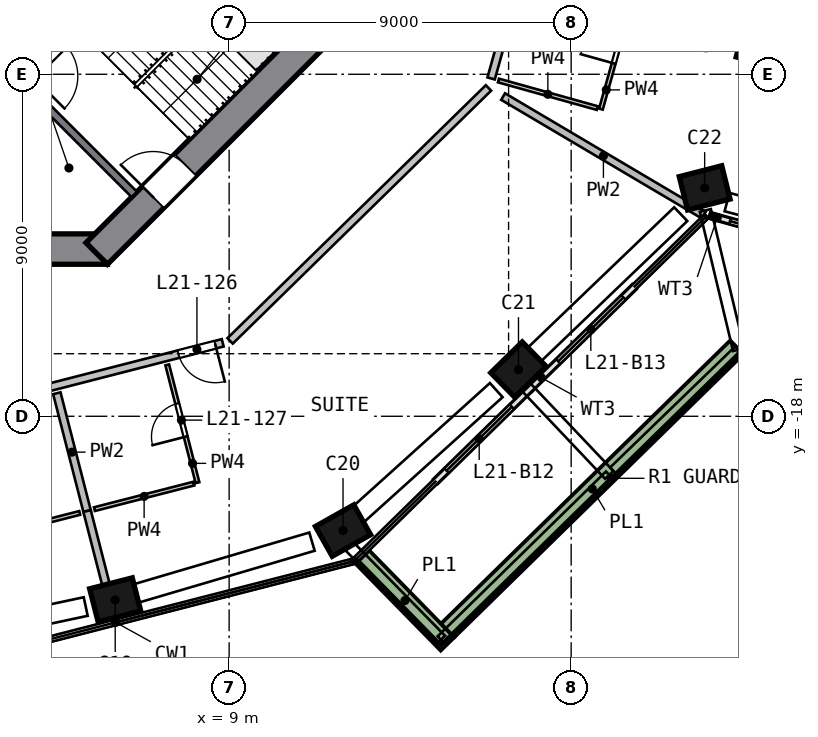
"""IFC4 building model, lengths in metres.
Left out: names, types, materials, properties, quantities, classifications, styles, units other than length and angle.
Written with IfcOpenShell. Run it as: python <this file> out.ifc"""

import sys

from ifc_helpers import new_model, si_unit, direction, frame, frame_2d, origin, origin_2d, place, context, subcontext, project, spatial, rectangle, extrude, element, fill, save


model = new_model("IFC4")
c1 = context("Model", 3, precision=1e-05, world=origin(), true_north=direction((0.0, 1.0)))
c2 = subcontext(c1, "Body", "Model", "MODEL_VIEW")
j1 = project(units=[si_unit("LENGTHUNIT", "METRE"), si_unit("PLANEANGLEUNIT", "RADIAN")], contexts=[c1])
p1 = place(None, origin())
s1 = spatial("IfcSite", under=j1, at=p1, CompositionType="ELEMENT")
p2 = place(p1, origin())
s2 = spatial("IfcBuilding", under=s1, at=p2, CompositionType="ELEMENT")
p3 = place(p2, frame((0.0, 0.0, 93.0)))
s3 = spatial("IfcBuildingStorey", under=s2, at=p3, CompositionType="ELEMENT", Elevation=93.0)
p4 = place(p3, frame((5.871, -22.867, 0.0), z_axis=(0.108524069, 0.028823141, 0.993675879), x_axis=(0.962510976, 0.246911463, -0.112282459)))
e1 = element("IfcColumn", 1, at=p4, inside=s3, PredefinedType="COLUMN", context=c2, shape_type="SweptSolid", body=[
    extrude(rectangle(XDim=1.15, YDim=0.9, at=origin_2d()), origin(), (0.0, 0.0, 1.0), 3.21),
])
p5 = place(p3, frame((11.876, -21.077, 0.0), z_axis=(0.099746568, 0.057323866, 0.993360255), x_axis=(-0.865435181, -0.487634582, 0.115041132)))
e2 = element("IfcColumn", 2, at=p5, inside=s3, PredefinedType="COLUMN", context=c2, shape_type="SweptSolid", body=[
    extrude(rectangle(XDim=1.15, YDim=0.9, at=origin_2d()), origin(), (0.0, 0.0, 1.0), 3.211),
])
p6 = place(p3, frame((16.518, -16.867, 0.0), z_axis=(0.079548847, 0.079244645, 0.993676138), x_axis=(0.709905463, 0.695289434, -0.11228017)))
e3 = element("IfcColumn", 3, at=p6, inside=s3, PredefinedType="COLUMN", context=c2, shape_type="SweptSolid", body=[
    extrude(rectangle(XDim=1.15, YDim=0.9, at=origin_2d()), origin(), (0.0, 0.0, 1.0), 3.21),
])
p7 = place(p3, frame((21.444, -12.113, 0.0), z_axis=(0.056777694, 0.102458276, 0.9931156), x_axis=(-0.96720596, -0.24101204, 0.080161264)))
e4 = element("IfcColumn", 4, at=p7, inside=s3, PredefinedType="COLUMN", context=c2, shape_type="SweptSolid", body=[
    extrude(rectangle(XDim=1.15, YDim=0.9, at=origin_2d()), origin(), (0.0, 0.0, 1.0), 3.212),
])
p8 = place(p3, frame((22.852, -8.36, 0.0), z_axis=(0.038846363, 0.109013082, 0.993280981), x_axis=(0.962880734, -0.269807256, -0.008045955)))
e5 = element("IfcColumn", 5, at=p8, inside=s3, PredefinedType="COLUMN", context=c2, shape_type="SweptSolid", body=[
    extrude(rectangle(XDim=0.9, YDim=0.9, at=origin_2d()), origin(), (0.0, 0.0, 1.0), 3.211),
])
p9 = place(p3, frame((-5.799, -13.6, 0.0), z_axis=(0.0, 0.0, 1.0), x_axis=(1.0, 0.0, 0.0)))
e6 = element("IfcWall", 6, at=p9, inside=s3, PredefinedType="SHEAR", context=c2, shape_type="SweptSolid", body=[
    extrude(rectangle(XDim=11.598, YDim=0.8, at=frame_2d((5.799, 0.0))), origin(), (0.0, 0.0, 1.0), 3.5),
])
p10 = place(p9, frame((4.899, 0.0, 0.0)))
e7 = element("IfcOpeningElement", 7, at=p10, cuts=e6, PredefinedType="OPENING", context=c2, shape_type="SweptSolid", body=[
    extrude(rectangle(XDim=1.8, YDim=2.1, at=frame_2d((0.9, 1.05))), frame((0.0, 0.41, 0.0), z_axis=(0.0, -1.0, 0.0), x_axis=(1.0, 0.0, 0.0)), (0.0, 0.0, 1.0), 0.82),
])
p11 = place(p3, frame((5.516, -13.717, 0.0), z_axis=(0.0, 0.0, 1.0), x_axis=(0.707106781, 0.707106781, 0.0)))
e8 = element("IfcWall", 8, at=p11, inside=s3, PredefinedType="SHEAR", context=c2, shape_type="SweptSolid", body=[
    extrude(rectangle(XDim=11.598, YDim=0.8, at=frame_2d((5.799, 0.0))), origin(), (0.0, 0.0, 1.0), 3.5),
])
p12 = place(p11, frame((2.099, 0.0, 0.0)))
e9 = element("IfcOpeningElement", 9, at=p12, cuts=e8, PredefinedType="OPENING", context=c2, shape_type="SweptSolid", body=[
    extrude(rectangle(XDim=1.2, YDim=2.1, at=frame_2d((0.6, 1.05))), frame((0.0, 0.41, 0.0), z_axis=(0.0, -1.0, 0.0), x_axis=(1.0, 0.0, 0.0)), (0.0, 0.0, 1.0), 0.82),
])
p13 = place(p3, frame((14.438, -19.71, 0.0), z_axis=(0.0, 0.0, 1.0), x_axis=(0.714445304, 0.699691295, 0.0)))
e10 = element("IfcWall", 10, at=p13, inside=s3, PredefinedType="SOLIDWALL", context=c2, shape_type="SweptSolid", body=[
    extrude(rectangle(XDim=3.475, YDim=0.15, at=frame_2d((1.737, 0.0))), origin(), (0.0, 0.0, 1.0), 2.425),
])
p14 = place(p13, frame((0.4, 0.0, 0.0)))
e11 = element("IfcOpeningElement", 11, at=p14, cuts=e10, PredefinedType="OPENING", context=c2, shape_type="SweptSolid", body=[
    extrude(rectangle(XDim=2.4, YDim=2.4, at=frame_2d((1.2, 1.2))), frame((0.0, 0.085, 0.0), z_axis=(0.0, -1.0, 0.0), x_axis=(1.0, 0.0, 0.0)), (0.0, 0.0, 1.0), 0.17),
])
p15 = place(p3, frame((16.92, -17.278, 0.0), z_axis=(0.0, 0.0, 1.0), x_axis=(0.714483248, 0.699652549, 0.0)))
e12 = element("IfcWall", 12, at=p15, inside=s3, PredefinedType="SOLIDWALL", context=c2, shape_type="SweptSolid", body=[
    extrude(rectangle(XDim=3.836, YDim=0.15, at=frame_2d((1.918, 0.0))), origin(), (0.0, 0.0, 1.0), 2.425),
])
p16 = place(p15, frame((1.035, 0.0, 0.0)))
e13 = element("IfcOpeningElement", 13, at=p16, cuts=e12, PredefinedType="OPENING", context=c2, shape_type="SweptSolid", body=[
    extrude(rectangle(XDim=2.4, YDim=2.4, at=frame_2d((1.2, 1.2))), frame((0.0, 0.085, 0.0), z_axis=(0.0, -1.0, 0.0), x_axis=(1.0, 0.0, 0.0)), (0.0, 0.0, 1.0), 0.17),
])
p17 = place(p3, frame((21.704, -12.731, 0.0), z_axis=(0.0, 0.0, 1.0), x_axis=(0.963162375, -0.268920509, 0.0)))
e14 = element("IfcWall", 14, at=p17, inside=s3, PredefinedType="SOLIDWALL", context=c2, shape_type="SweptSolid", body=[
    extrude(rectangle(XDim=3.294, YDim=0.15, at=frame_2d((1.647, 0.0))), origin(), (0.0, 0.0, 1.0), 2.425),
])
p18 = place(p17, frame((0.494, 0.0, 0.0)))
e15 = element("IfcOpeningElement", 15, at=p18, cuts=e14, PredefinedType="OPENING", context=c2, shape_type="SweptSolid", body=[
    extrude(rectangle(XDim=2.4, YDim=2.4, at=frame_2d((1.2, 1.2))), frame((0.0, 0.085, 0.0), z_axis=(0.0, -1.0, 0.0), x_axis=(1.0, 0.0, 0.0)), (0.0, 0.0, 1.0), 0.17),
])
p19 = place(p3, frame((12.508, -21.706, 0.0), z_axis=(0.0, 0.0, 1.0), x_axis=(0.699665376, -0.714470686, 0.0)))
e16 = element("IfcWall", 16, at=p19, inside=s3, PredefinedType="SOLIDWALL", context=c2, shape_type="SweptSolid", body=[
    extrude(rectangle(XDim=3.199, YDim=0.5, at=frame_2d((1.6, 0.0))), origin(), (0.0, 0.0, 1.0), 0.7),
])
p20 = place(p3, frame((14.75, -23.638, 0.0), z_axis=(0.0, 0.0, 1.0), x_axis=(0.714470566, 0.699665499, 0.0)))
e17 = element("IfcWall", 17, at=p20, inside=s3, PredefinedType="SOLIDWALL", context=c2, shape_type="SweptSolid", body=[
    extrude(rectangle(XDim=10.653, YDim=0.5, at=frame_2d((5.326, 0.0))), origin(), (0.0, 0.0, 1.0), 0.7),
])
p21 = place(p3, frame((9.334, -3.535, 0.0), z_axis=(0.0, 0.0, 1.0), x_axis=(-0.707106781, -0.707106781, 0.0)))
e18 = element("IfcWall", 18, at=p21, inside=s3, PredefinedType="SOLIDWALL", context=c2, shape_type="SweptSolid", body=[
    extrude(rectangle(XDim=8.2, YDim=0.2, at=frame_2d((4.1, 0.0))), origin(), (0.0, 0.0, 1.0), 3.19),
])
p22 = place(p21, frame((6.6, 0.0, 0.0)))
e19 = element("IfcOpeningElement", 19, at=p22, cuts=e18, PredefinedType="OPENING", context=c2, shape_type="SweptSolid", body=[
    extrude(rectangle(XDim=1.2, YDim=2.1, at=frame_2d((0.6, 1.05))), frame((0.0, 0.11, 0.0), z_axis=(0.0, -1.0, 0.0), x_axis=(1.0, 0.0, 0.0)), (0.0, 0.0, 1.0), 0.22),
])
p23 = place(p3, frame((3.677, -9.334, 0.0), z_axis=(0.0, 0.0, 1.0), x_axis=(0.707106781, -0.707106781, 0.0)))
e20 = element("IfcWall", 20, at=p23, inside=s3, PredefinedType="SOLIDWALL", context=c2, shape_type="SweptSolid", body=[
    extrude(rectangle(XDim=4.0, YDim=0.2, at=frame_2d((2.0, 0.0))), origin(), (0.0, 0.0, 1.0), 3.19),
])
p24 = place(p3, frame((8.831, -16.067, 0.0), z_axis=(0.0, 0.0, 1.0), x_axis=(-0.968582197, -0.248693643, 0.0)))
e21 = element("IfcWall", 21, at=p24, inside=s3, PredefinedType="SOLIDWALL", context=c2, shape_type="SweptSolid", body=[
    extrude(rectangle(XDim=9.116, YDim=0.2, at=frame_2d((4.558, 0.0))), origin(), (0.0, 0.0, 1.0), 3.19),
])
p25 = place(p24, frame((0.2, 0.0, 0.0)))
e22 = element("IfcOpeningElement", 22, at=p25, cuts=e21, PredefinedType="OPENING", context=c2, shape_type="SweptSolid", body=[
    extrude(rectangle(XDim=1.0, YDim=2.1, at=frame_2d((0.5, 1.05))), frame((0.0, 0.11, 0.0), z_axis=(0.0, -1.0, 0.0), x_axis=(1.0, 0.0, 0.0)), (0.0, 0.0, 1.0), 0.22),
])
p26 = place(p3, frame((9.025, -16.017, 0.0), z_axis=(0.0, 0.0, 1.0), x_axis=(0.714482371, 0.699653444, 0.0)))
e23 = element("IfcWall", 23, at=p26, inside=s3, PredefinedType="SOLIDWALL", context=c2, shape_type="SweptSolid", body=[
    extrude(rectangle(XDim=9.516, YDim=0.2, at=frame_2d((4.758, 0.0))), origin(), (0.0, 0.0, 1.0), 3.19),
])
p27 = place(p3, frame((15.894, -9.11, 0.0), z_axis=(0.0, 0.0, 1.0), x_axis=(0.268902762, 0.963167329, 0.0)))
e24 = element("IfcWall", 24, at=p27, inside=s3, PredefinedType="SOLIDWALL", context=c2, shape_type="SweptSolid", body=[
    extrude(rectangle(XDim=3.4, YDim=0.2, at=frame_2d((1.7, 0.0))), origin(), (0.0, 0.0, 1.0), 3.19),
])
p28 = place(p3, frame((17.001, -5.889, 0.0), z_axis=(0.0, 0.0, 1.0), x_axis=(0.963163806, -0.268915381, 0.0)))
e25 = element("IfcWall", 25, at=p28, inside=s3, PredefinedType="SOLIDWALL", context=c2, shape_type="SweptSolid", body=[
    extrude(rectangle(XDim=12.624, YDim=0.2, at=frame_2d((6.312, 0.0))), origin(), (0.0, 0.0, 1.0), 3.19),
])
p29 = place(p3, frame((4.466, -17.394, 0.0), z_axis=(0.0, 0.0, 1.0), x_axis=(0.248705722, -0.968579095, 0.0)))
e26 = element("IfcWall", 26, at=p29, inside=s3, PredefinedType="SOLIDWALL", context=c2, shape_type="SweptSolid", body=[
    extrude(rectangle(XDim=3.2, YDim=0.2, at=frame_2d((1.6, 0.0))), origin(), (0.0, 0.0, 1.0), 3.19),
])
p30 = place(p3, frame((5.262, -20.494, 0.0), z_axis=(0.0, 0.0, 1.0), x_axis=(0.248703888, -0.968579566, 0.0)))
e27 = element("IfcWall", 27, at=p30, inside=s3, PredefinedType="SOLIDWALL", context=c2, shape_type="SweptSolid", body=[
    extrude(rectangle(XDim=2.95, YDim=0.2, at=frame_2d((1.475, 0.0))), origin(), (0.0, 0.0, 1.0), 3.19),
])
p31 = place(p3, frame((16.209, -9.586, 0.0), z_axis=(0.0, 0.0, 1.0), x_axis=(0.860732275, -0.509057906, 0.0)))
e28 = element("IfcWall", 28, at=p31, inside=s3, PredefinedType="SOLIDWALL", context=c2, shape_type="SweptSolid", body=[
    extrude(rectangle(XDim=6.132, YDim=0.2, at=frame_2d((3.066, 0.0))), origin(), (0.0, 0.0, 1.0), 3.19),
])
p32 = place(p3, frame((2.453, -21.215, 0.0), z_axis=(0.0, 0.0, 1.0), x_axis=(0.968569528, 0.248742977, 0.0)))
e29 = element("IfcWall", 29, at=p32, inside=s3, PredefinedType="PARTITIONING", context=c2, shape_type="SweptSolid", body=[
    extrude(rectangle(XDim=2.7, YDim=0.1, at=frame_2d((1.35, 0.0))), origin(), (0.0, 0.0, 1.0), 3.19),
])
p33 = place(p3, frame((8.071, -19.772, 0.0), z_axis=(0.0, 0.0, 1.0), x_axis=(-0.968591309, -0.24865815, 0.0)))
e30 = element("IfcWall", 30, at=p33, inside=s3, PredefinedType="PARTITIONING", context=c2, shape_type="SweptSolid", body=[
    extrude(rectangle(XDim=2.7, YDim=0.1, at=frame_2d((1.35, 0.0))), origin(), (0.0, 0.0, 1.0), 3.19),
])
p34 = place(p3, frame((8.167, -19.748, 0.0), z_axis=(0.0, 0.0, 1.0), x_axis=(-0.248652523, 0.968592754, 0.0)))
e31 = element("IfcWall", 31, at=p34, inside=s3, PredefinedType="PARTITIONING", context=c2, shape_type="SweptSolid", body=[
    extrude(rectangle(XDim=3.2, YDim=0.1, at=frame_2d((1.6, 0.0))), origin(), (0.0, 0.0, 1.0), 3.19),
])
p35 = place(p34, frame((1.25, 0.0, 0.0)))
e32 = element("IfcOpeningElement", 32, at=p35, cuts=e31, PredefinedType="OPENING", context=c2, shape_type="SweptSolid", body=[
    extrude(rectangle(XDim=0.9, YDim=2.1, at=frame_2d((0.45, 1.05))), frame((0.0, 0.06, 0.0), z_axis=(0.0, -1.0, 0.0), x_axis=(1.0, 0.0, 0.0)), (0.0, 0.0, 1.0), 0.12),
])
p36 = place(p3, frame((16.087, -9.164, 0.0), z_axis=(0.0, 0.0, 1.0), x_axis=(0.963164718, -0.268912117, 0.0)))
e33 = element("IfcWall", 33, at=p36, inside=s3, PredefinedType="PARTITIONING", context=c2, shape_type="SweptSolid", body=[
    extrude(rectangle(XDim=2.7, YDim=0.1, at=frame_2d((1.35, 0.0))), origin(), (0.0, 0.0, 1.0), 3.19),
])
p37 = place(p3, frame((18.783, -9.917, 0.0), z_axis=(0.0, 0.0, 1.0), x_axis=(0.268942177, 0.963156324, 0.0)))
e34 = element("IfcWall", 34, at=p37, inside=s3, PredefinedType="PARTITIONING", context=c2, shape_type="SweptSolid", body=[
    extrude(rectangle(XDim=3.2, YDim=0.1, at=frame_2d((1.6, 0.0))), origin(), (0.0, 0.0, 1.0), 3.19),
])
p38 = place(p37, frame((1.25, 0.0, 0.0)))
e35 = element("IfcOpeningElement", 35, at=p38, cuts=e34, PredefinedType="OPENING", context=c2, shape_type="SweptSolid", body=[
    extrude(rectangle(XDim=0.9, YDim=2.1, at=frame_2d((0.45, 1.05))), frame((0.0, 0.06, 0.0), z_axis=(0.0, -1.0, 0.0), x_axis=(1.0, 0.0, 0.0)), (0.0, 0.0, 1.0), 0.12),
])
p39 = place(p14, origin())
e36 = element("IfcDoor", 36, at=p39, inside=s3, OperationType="SLIDING_TO_RIGHT", PredefinedType="DOOR", context=c2, shape_type="SweptSolid", body=[
    extrude(rectangle(XDim=2.4, YDim=2.4, at=frame_2d((1.2, 1.2))), frame((0.0, 0.025, 0.0), z_axis=(0.0, -1.0, 0.0), x_axis=(1.0, 0.0, 0.0)), (0.0, 0.0, 1.0), 0.05),
])
fill(e11, e36)
p40 = place(p16, origin())
e37 = element("IfcDoor", 37, at=p40, inside=s3, OperationType="SLIDING_TO_LEFT", PredefinedType="DOOR", context=c2, shape_type="SweptSolid", body=[
    extrude(rectangle(XDim=2.4, YDim=2.4, at=frame_2d((1.2, 1.2))), frame((0.0, 0.025, 0.0), z_axis=(0.0, -1.0, 0.0), x_axis=(1.0, 0.0, 0.0)), (0.0, 0.0, 1.0), 0.05),
])
fill(e13, e37)
p41 = place(p18, origin())
e38 = element("IfcDoor", 38, at=p41, inside=s3, OperationType="SLIDING_TO_LEFT", PredefinedType="DOOR", context=c2, shape_type="SweptSolid", body=[
    extrude(rectangle(XDim=2.4, YDim=2.4, at=frame_2d((1.2, 1.2))), frame((0.0, 0.025, 0.0), z_axis=(0.0, -1.0, 0.0), x_axis=(1.0, 0.0, 0.0)), (0.0, 0.0, 1.0), 0.05),
])
fill(e15, e38)
p42 = place(p22, origin())
e39 = element("IfcDoor", 39, at=p42, inside=s3, OperationType="SINGLE_SWING_RIGHT", PredefinedType="DOOR", context=c2, shape_type="SweptSolid", body=[
    extrude(rectangle(XDim=1.2, YDim=2.1, at=frame_2d((0.6, 1.05))), frame((0.0, 0.025, 0.0), z_axis=(0.0, -1.0, 0.0), x_axis=(1.0, 0.0, 0.0)), (0.0, 0.0, 1.0), 0.05),
])
fill(e19, e39)
p43 = place(p12, origin())
e40 = element("IfcDoor", 40, at=p43, inside=s3, OperationType="SINGLE_SWING_LEFT", PredefinedType="DOOR", context=c2, shape_type="SweptSolid", body=[
    extrude(rectangle(XDim=1.2, YDim=2.1, at=frame_2d((0.6, 1.05))), frame((0.0, 0.025, 0.0), z_axis=(0.0, -1.0, 0.0), x_axis=(1.0, 0.0, 0.0)), (0.0, 0.0, 1.0), 0.05),
])
fill(e9, e40)
p44 = place(p25, origin())
e41 = element("IfcDoor", 41, at=p44, inside=s3, OperationType="SINGLE_SWING_LEFT", PredefinedType="DOOR", context=c2, shape_type="SweptSolid", body=[
    extrude(rectangle(XDim=1.0, YDim=2.1, at=frame_2d((0.5, 1.05))), frame((0.0, 0.025, 0.0), z_axis=(0.0, -1.0, 0.0), x_axis=(1.0, 0.0, 0.0)), (0.0, 0.0, 1.0), 0.05),
])
fill(e22, e41)
p45 = place(p35, origin())
e42 = element("IfcDoor", 42, at=p45, inside=s3, OperationType="SINGLE_SWING_LEFT", PredefinedType="DOOR", context=c2, shape_type="SweptSolid", body=[
    extrude(rectangle(XDim=0.9, YDim=2.1, at=frame_2d((0.45, 1.05))), frame((0.0, 0.025, 0.0), z_axis=(0.0, -1.0, 0.0), x_axis=(1.0, 0.0, 0.0)), (0.0, 0.0, 1.0), 0.05),
])
fill(e32, e42)
p46 = place(p38, origin())
e43 = element("IfcDoor", 43, at=p46, inside=s3, OperationType="SINGLE_SWING_LEFT", PredefinedType="DOOR", context=c2, shape_type="SweptSolid", body=[
    extrude(rectangle(XDim=0.9, YDim=2.1, at=frame_2d((0.45, 1.05))), frame((0.0, 0.025, 0.0), z_axis=(0.0, -1.0, 0.0), x_axis=(1.0, 0.0, 0.0)), (0.0, 0.0, 1.0), 0.05),
])
fill(e35, e43)
save(model, sys.argv[1])
